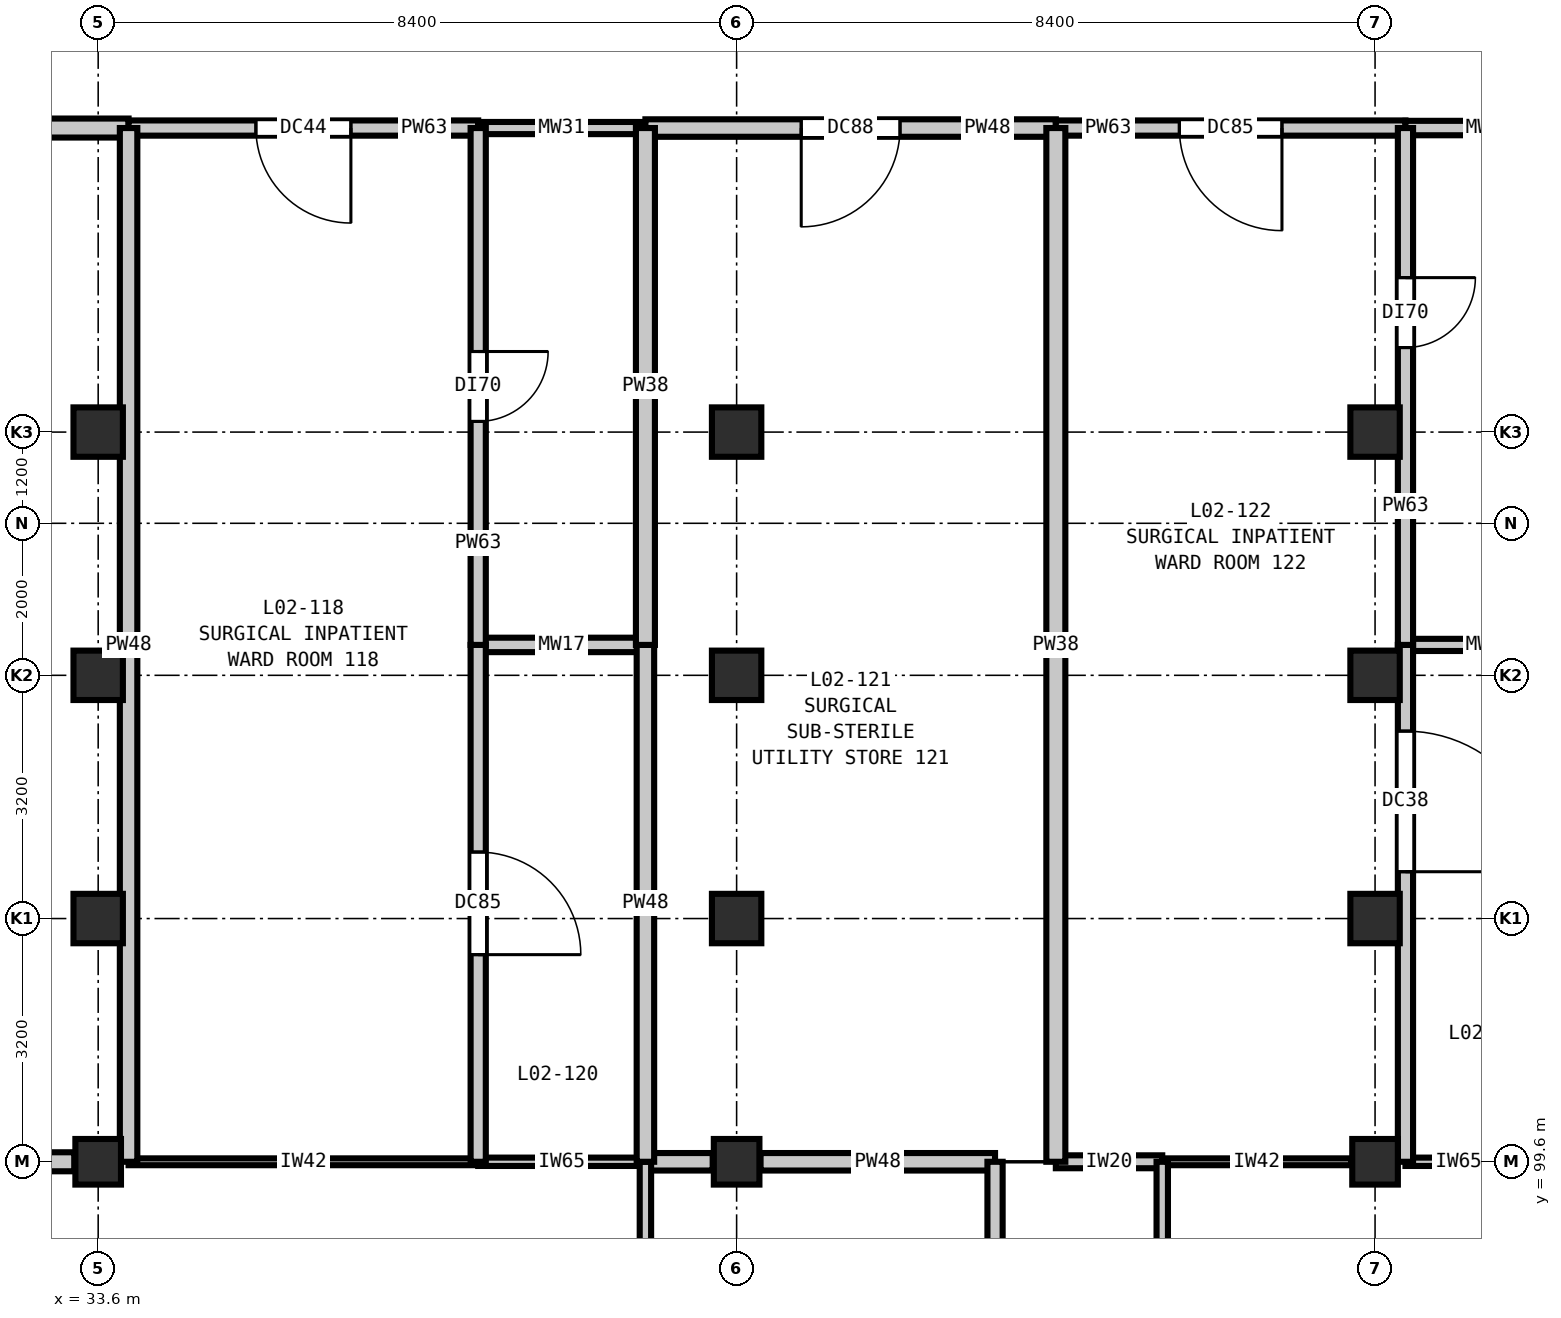
"""IFC4 building model, lengths in metres.
Left out: names, types, materials, properties, quantities, classifications, styles, units other than length and angle.
Written with IfcOpenShell. Run it as: python <this file> out.ifc"""

import sys

from ifc_helpers import new_model, si_unit, direction, frame, frame_2d, origin, origin_2d, place, context, subcontext, project, spatial, rectangle, extrude, element, fill, save


model = new_model("IFC4")
c1 = context("Model", 3, precision=1e-05, world=origin(), true_north=direction((0.0, 1.0)))
c2 = subcontext(c1, "Body", "Model", "MODEL_VIEW")
j1 = project(units=[si_unit("LENGTHUNIT", "METRE"), si_unit("PLANEANGLEUNIT", "RADIAN")], contexts=[c1])
p1 = place(None, origin())
s1 = spatial("IfcSite", under=j1, at=p1, CompositionType="ELEMENT")
p2 = place(p1, origin())
s2 = spatial("IfcBuilding", under=s1, at=p2, CompositionType="ELEMENT")
p3 = place(p2, frame((0.0, 0.0, 10.8)))
s3 = spatial("IfcBuildingStorey", under=s2, at=p3, CompositionType="ELEMENT", Elevation=10.8)
p4 = place(p3, frame((33.6, 99.6, 0.0), z_axis=(0.0, 0.0, 1.0), x_axis=(1.0, 0.0, 0.0)))
e1 = element("IfcColumn", 1, at=p4, inside=s3, PredefinedType="COLUMN", context=c2, shape_type="SweptSolid", body=[
    extrude(rectangle(XDim=0.6, YDim=0.6, at=origin_2d()), origin(), (0.0, 0.0, 1.0), 5.4),
])
for number, where, z_axis, x_axis in (
    (2, (33.6, 102.8, 0.0), (0.0, 0.0, 1.0), (1.0, 0.0, 0.0)),
    (3, (33.6, 106.0, 0.0), (0.0, 0.0, 1.0), (1.0, 0.0, 0.0)),
    (4, (33.6, 109.2, 0.0), (0.0, 0.0, 1.0), (1.0, 0.0, 0.0)),
):
    element("IfcColumn", number, at=place(p3, frame(where, z_axis=z_axis, x_axis=x_axis)), inside=s3, PredefinedType="COLUMN", context=c2, shape_type="SweptSolid", body=[
        extrude(rectangle(XDim=0.65, YDim=0.65, at=origin_2d()), origin(), (0.0, 0.0, 1.0), 5.4),
    ])
p5 = place(p3, frame((42.0, 99.6, 0.0), z_axis=(0.0, 0.0, 1.0), x_axis=(1.0, 0.0, 0.0)))
e5 = element("IfcColumn", 5, at=p5, inside=s3, PredefinedType="COLUMN", context=c2, shape_type="SweptSolid", body=[
    extrude(rectangle(XDim=0.6, YDim=0.6, at=origin_2d()), origin(), (0.0, 0.0, 1.0), 5.4),
])
for number, where, z_axis, x_axis in (
    (6, (42.0, 102.8, 0.0), (0.0, 0.0, 1.0), (1.0, 0.0, 0.0)),
    (7, (42.0, 106.0, 0.0), (0.0, 0.0, 1.0), (1.0, 0.0, 0.0)),
    (8, (42.0, 109.2, 0.0), (0.0, 0.0, 1.0), (1.0, 0.0, 0.0)),
):
    element("IfcColumn", number, at=place(p3, frame(where, z_axis=z_axis, x_axis=x_axis)), inside=s3, PredefinedType="COLUMN", context=c2, shape_type="SweptSolid", body=[
        extrude(rectangle(XDim=0.65, YDim=0.65, at=origin_2d()), origin(), (0.0, 0.0, 1.0), 5.4),
    ])
p6 = place(p3, frame((50.4, 99.6, 0.0), z_axis=(0.0, 0.0, 1.0), x_axis=(1.0, 0.0, 0.0)))
e9 = element("IfcColumn", 9, at=p6, inside=s3, PredefinedType="COLUMN", context=c2, shape_type="SweptSolid", body=[
    extrude(rectangle(XDim=0.6, YDim=0.6, at=origin_2d()), origin(), (0.0, 0.0, 1.0), 5.4),
])
for number, where, z_axis, x_axis in (
    (10, (50.4, 102.8, 0.0), (0.0, 0.0, 1.0), (1.0, 0.0, 0.0)),
    (11, (50.4, 106.0, 0.0), (0.0, 0.0, 1.0), (1.0, 0.0, 0.0)),
    (12, (50.4, 109.2, 0.0), (0.0, 0.0, 1.0), (1.0, 0.0, 0.0)),
):
    element("IfcColumn", number, at=place(p3, frame(where, z_axis=z_axis, x_axis=x_axis)), inside=s3, PredefinedType="COLUMN", context=c2, shape_type="SweptSolid", body=[
        extrude(rectangle(XDim=0.65, YDim=0.65, at=origin_2d()), origin(), (0.0, 0.0, 1.0), 5.4),
    ])
p7 = place(p3, frame((29.6, 99.6, 0.0), z_axis=(0.0, 0.0, 1.0), x_axis=(1.0, 0.0, 0.0)))
e13 = element("IfcWall", 13, at=p7, inside=s3, PredefinedType="PARTITIONING", context=c2, shape_type="SweptSolid", body=[
    extrude(rectangle(XDim=3.685, YDim=0.25, at=frame_2d((1.842, 0.0))), origin(), (0.0, 0.0, 1.0), 4.735),
])
p8 = place(p3, frame((34.0, 99.6, 0.0), z_axis=(0.0, 0.0, 1.0), x_axis=(1.0, 0.0, 0.0)))
e14 = element("IfcWall", 14, at=p8, inside=s3, PredefinedType="PARTITIONING", context=c2, shape_type="SweptSolid", body=[
    extrude(rectangle(XDim=4.6, YDim=0.09, at=frame_2d((2.3, 0.0))), origin(), (0.0, 0.0, 1.0), 4.735),
])
p9 = place(p3, frame((38.6, 99.6, 0.0), z_axis=(0.0, 0.0, 1.0), x_axis=(1.0, 0.0, 0.0)))
e15 = element("IfcWall", 15, at=p9, inside=s3, PredefinedType="PARTITIONING", context=c2, shape_type="SweptSolid", body=[
    extrude(rectangle(XDim=2.2, YDim=0.11, at=frame_2d((1.1, 0.0))), origin(), (0.0, 0.0, 1.0), 4.735),
])
p10 = place(p3, frame((42.315, 99.6, 0.0), z_axis=(0.0, 0.0, 1.0), x_axis=(1.0, 0.0, 0.0)))
e16 = element("IfcWall", 16, at=p10, inside=s3, PredefinedType="PARTITIONING", context=c2, shape_type="SweptSolid", body=[
    extrude(rectangle(XDim=3.085, YDim=0.23, at=frame_2d((1.542, 0.0))), origin(), (0.0, 0.0, 1.0), 4.735),
])
p11 = place(p3, frame((40.8, 99.6, 0.0), z_axis=(0.0, 0.0, 1.0), x_axis=(1.0, 0.0, 0.0)))
e17 = element("IfcWall", 17, at=p11, inside=s3, PredefinedType="PARTITIONING", context=c2, shape_type="SweptSolid", body=[
    extrude(rectangle(XDim=0.885, YDim=0.23, at=frame_2d((0.442, 0.0))), origin(), (0.0, 0.0, 1.0), 4.735),
])
p12 = place(p3, frame((46.2, 99.6, 0.0), z_axis=(0.0, 0.0, 1.0), x_axis=(1.0, 0.0, 0.0)))
e18 = element("IfcWall", 18, at=p12, inside=s3, PredefinedType="PARTITIONING", context=c2, shape_type="SweptSolid", body=[
    extrude(rectangle(XDim=1.4, YDim=0.17, at=frame_2d((0.7, 0.0))), origin(), (0.0, 0.0, 1.0), 4.735),
])
p13 = place(p3, frame((47.6, 99.6, 0.0), z_axis=(0.0, 0.0, 1.0), x_axis=(1.0, 0.0, 0.0)))
e19 = element("IfcWall", 19, at=p13, inside=s3, PredefinedType="PARTITIONING", context=c2, shape_type="SweptSolid", body=[
    extrude(rectangle(XDim=2.485, YDim=0.09, at=frame_2d((1.242, 0.0))), origin(), (0.0, 0.0, 1.0), 4.735),
])
p14 = place(p3, frame((50.8, 99.6, 0.0), z_axis=(0.0, 0.0, 1.0), x_axis=(1.0, 0.0, 0.0)))
e20 = element("IfcWall", 20, at=p14, inside=s3, PredefinedType="PARTITIONING", context=c2, shape_type="SweptSolid", body=[
    extrude(rectangle(XDim=1.4, YDim=0.11, at=frame_2d((0.7, 0.0))), origin(), (0.0, 0.0, 1.0), 4.735),
])
p15 = place(p3, frame((38.6, 106.4, 0.0), z_axis=(0.0, 0.0, 1.0), x_axis=(1.0, 0.0, 0.0)))
e21 = element("IfcWall", 21, at=p15, inside=s3, PredefinedType="PLUMBINGWALL", context=c2, shape_type="SweptSolid", body=[
    extrude(rectangle(XDim=2.2, YDim=0.19, at=frame_2d((1.1, 0.0))), origin(), (0.0, 0.0, 1.0), 5.07),
])
p16 = place(p3, frame((50.8, 106.4, 0.0), z_axis=(0.0, 0.0, 1.0), x_axis=(1.0, 0.0, 0.0)))
e22 = element("IfcWall", 22, at=p16, inside=s3, PredefinedType="PLUMBINGWALL", context=c2, shape_type="SweptSolid", body=[
    extrude(rectangle(XDim=2.2, YDim=0.16, at=frame_2d((1.1, 0.0))), origin(), (0.0, 0.0, 1.0), 5.07),
])
p17 = place(p3, frame((28.6, 113.2, 0.0), z_axis=(0.0, 0.0, 1.0), x_axis=(1.0, 0.0, 0.0)))
e23 = element("IfcWall", 23, at=p17, inside=s3, PredefinedType="PARTITIONING", context=c2, shape_type="SweptSolid", body=[
    extrude(rectangle(XDim=5.4, YDim=0.25, at=frame_2d((2.7, 0.0))), origin(), (0.0, 0.0, 1.0), 5.07),
])
p18 = place(p17, frame((1.775, 0.0, 0.0)))
e24 = element("IfcOpeningElement", 24, at=p18, cuts=e23, PredefinedType="OPENING", context=c2, shape_type="SweptSolid", body=[
    extrude(rectangle(XDim=1.85, YDim=2.3, at=frame_2d((0.925, 1.15))), frame((0.0, 0.135, 0.0), z_axis=(0.0, -1.0, 0.0), x_axis=(1.0, 0.0, 0.0)), (0.0, 0.0, 1.0), 0.27),
])
p19 = place(p3, frame((34.0, 113.2, 0.0), z_axis=(0.0, 0.0, 1.0), x_axis=(1.0, 0.0, 0.0)))
e25 = element("IfcWall", 25, at=p19, inside=s3, PredefinedType="PARTITIONING", context=c2, shape_type="SweptSolid", body=[
    extrude(rectangle(XDim=4.6, YDim=0.2, at=frame_2d((2.3, 0.0))), origin(), (0.0, 0.0, 1.0), 5.07),
])
p20 = place(p19, frame((1.675, 0.0, 0.0)))
e26 = element("IfcOpeningElement", 26, at=p20, cuts=e25, PredefinedType="OPENING", context=c2, shape_type="SweptSolid", body=[
    extrude(rectangle(XDim=1.25, YDim=2.15, at=frame_2d((0.625, 1.075))), frame((0.0, 0.11, 0.0), z_axis=(0.0, -1.0, 0.0), x_axis=(1.0, 0.0, 0.0)), (0.0, 0.0, 1.0), 0.22),
])
p21 = place(p3, frame((38.6, 113.2, 0.0), z_axis=(0.0, 0.0, 1.0), x_axis=(1.0, 0.0, 0.0)))
e27 = element("IfcWall", 27, at=p21, inside=s3, PredefinedType="PLUMBINGWALL", context=c2, shape_type="SweptSolid", body=[
    extrude(rectangle(XDim=2.2, YDim=0.16, at=frame_2d((1.1, 0.0))), origin(), (0.0, 0.0, 1.0), 5.07),
])
p22 = place(p3, frame((40.8, 113.2, 0.0), z_axis=(0.0, 0.0, 1.0), x_axis=(1.0, 0.0, 0.0)))
e28 = element("IfcWall", 28, at=p22, inside=s3, PredefinedType="PARTITIONING", context=c2, shape_type="SweptSolid", body=[
    extrude(rectangle(XDim=5.4, YDim=0.23, at=frame_2d((2.7, 0.0))), origin(), (0.0, 0.0, 1.0), 5.07),
])
p23 = place(p22, frame((2.05, 0.0, 0.0)))
e29 = element("IfcOpeningElement", 29, at=p23, cuts=e28, PredefinedType="OPENING", context=c2, shape_type="SweptSolid", body=[
    extrude(rectangle(XDim=1.3, YDim=2.2, at=frame_2d((0.65, 1.1))), frame((0.0, 0.125, 0.0), z_axis=(0.0, -1.0, 0.0), x_axis=(1.0, 0.0, 0.0)), (0.0, 0.0, 1.0), 0.25),
])
p24 = place(p3, frame((46.2, 113.2, 0.0), z_axis=(0.0, 0.0, 1.0), x_axis=(1.0, 0.0, 0.0)))
e30 = element("IfcWall", 30, at=p24, inside=s3, PredefinedType="PARTITIONING", context=c2, shape_type="SweptSolid", body=[
    extrude(rectangle(XDim=4.6, YDim=0.2, at=frame_2d((2.3, 0.0))), origin(), (0.0, 0.0, 1.0), 5.07),
])
p25 = place(p24, frame((1.625, 0.0, 0.0)))
e31 = element("IfcOpeningElement", 31, at=p25, cuts=e30, PredefinedType="OPENING", context=c2, shape_type="SweptSolid", body=[
    extrude(rectangle(XDim=1.35, YDim=2.2, at=frame_2d((0.675, 1.1))), frame((0.0, 0.11, 0.0), z_axis=(0.0, -1.0, 0.0), x_axis=(1.0, 0.0, 0.0)), (0.0, 0.0, 1.0), 0.22),
])
p26 = place(p3, frame((50.8, 113.2, 0.0), z_axis=(0.0, 0.0, 1.0), x_axis=(1.0, 0.0, 0.0)))
e32 = element("IfcWall", 32, at=p26, inside=s3, PredefinedType="PLUMBINGWALL", context=c2, shape_type="SweptSolid", body=[
    extrude(rectangle(XDim=2.2, YDim=0.19, at=frame_2d((1.1, 0.0))), origin(), (0.0, 0.0, 1.0), 5.07),
])
p27 = place(p3, frame((34.0, 99.6, 0.0), z_axis=(0.0, 0.0, 1.0), x_axis=(0.0, 1.0, 0.0)))
e33 = element("IfcWall", 33, at=p27, inside=s3, PredefinedType="PARTITIONING", context=c2, shape_type="SweptSolid", body=[
    extrude(rectangle(XDim=13.6, YDim=0.23, at=frame_2d((6.8, 0.0))), origin(), (0.0, 0.0, 1.0), 5.07),
])
p28 = place(p3, frame((38.6, 99.6, 0.0), z_axis=(0.0, 0.0, 1.0), x_axis=(0.0, 1.0, 0.0)))
e34 = element("IfcWall", 34, at=p28, inside=s3, PredefinedType="PARTITIONING", context=c2, shape_type="SweptSolid", body=[
    extrude(rectangle(XDim=6.8, YDim=0.2, at=frame_2d((3.4, 0.0))), origin(), (0.0, 0.0, 1.0), 5.07),
])
p29 = place(p28, frame((2.725, 0.0, 0.0)))
e35 = element("IfcOpeningElement", 35, at=p29, cuts=e34, PredefinedType="OPENING", context=c2, shape_type="SweptSolid", body=[
    extrude(rectangle(XDim=1.35, YDim=2.2, at=frame_2d((0.675, 1.1))), frame((0.0, 0.11, 0.0), z_axis=(0.0, -1.0, 0.0), x_axis=(1.0, 0.0, 0.0)), (0.0, 0.0, 1.0), 0.22),
])
p30 = place(p3, frame((38.6, 106.4, 0.0), z_axis=(0.0, 0.0, 1.0), x_axis=(0.0, 1.0, 0.0)))
e36 = element("IfcWall", 36, at=p30, inside=s3, PredefinedType="PARTITIONING", context=c2, shape_type="SweptSolid", body=[
    extrude(rectangle(XDim=6.8, YDim=0.2, at=frame_2d((3.4, 0.0))), origin(), (0.0, 0.0, 1.0), 5.07),
])
p31 = place(p30, frame((2.94, 0.0, 0.0)))
e37 = element("IfcOpeningElement", 37, at=p31, cuts=e36, PredefinedType="OPENING", context=c2, shape_type="SweptSolid", body=[
    extrude(rectangle(XDim=0.92, YDim=2.1, at=frame_2d((0.46, 1.05))), frame((0.0, 0.11, 0.0), z_axis=(0.0, -1.0, 0.0), x_axis=(1.0, 0.0, 0.0)), (0.0, 0.0, 1.0), 0.22),
])
p32 = place(p3, frame((40.8, 88.6, 0.0), z_axis=(0.0, 0.0, 1.0), x_axis=(0.0, 1.0, 0.0)))
e38 = element("IfcWall", 38, at=p32, inside=s3, PredefinedType="PARTITIONING", context=c2, shape_type="SweptSolid", body=[
    extrude(rectangle(XDim=11.0, YDim=0.15, at=frame_2d((5.5, 0.0))), origin(), (0.0, 0.0, 1.0), 5.07),
])
p33 = place(p3, frame((40.8, 99.6, 0.0), z_axis=(0.0, 0.0, 1.0), x_axis=(0.0, 1.0, 0.0)))
e39 = element("IfcWall", 39, at=p33, inside=s3, PredefinedType="PARTITIONING", context=c2, shape_type="SweptSolid", body=[
    extrude(rectangle(XDim=6.8, YDim=0.23, at=frame_2d((3.4, 0.0))), origin(), (0.0, 0.0, 1.0), 5.07),
])
p34 = place(p3, frame((40.8, 106.4, 0.0), z_axis=(0.0, 0.0, 1.0), x_axis=(0.0, 1.0, 0.0)))
e40 = element("IfcWall", 40, at=p34, inside=s3, PredefinedType="PARTITIONING", context=c2, shape_type="SweptSolid", body=[
    extrude(rectangle(XDim=6.8, YDim=0.25, at=frame_2d((3.4, 0.0))), origin(), (0.0, 0.0, 1.0), 5.07),
])
p35 = place(p3, frame((45.4, 94.1, 0.0), z_axis=(0.0, 0.0, 1.0), x_axis=(0.0, 1.0, 0.0)))
e41 = element("IfcWall", 41, at=p35, inside=s3, PredefinedType="PARTITIONING", context=c2, shape_type="SweptSolid", body=[
    extrude(rectangle(XDim=5.5, YDim=0.2, at=frame_2d((2.75, 0.0))), origin(), (0.0, 0.0, 1.0), 5.07),
])
p36 = place(p35, frame((1.9, 0.0, 0.0)))
e42 = element("IfcOpeningElement", 42, at=p36, cuts=e41, PredefinedType="OPENING", context=c2, shape_type="SweptSolid", body=[
    extrude(rectangle(XDim=1.7, YDim=2.3, at=frame_2d((0.85, 1.15))), frame((0.0, 0.11, 0.0), z_axis=(0.0, -1.0, 0.0), x_axis=(1.0, 0.0, 0.0)), (0.0, 0.0, 1.0), 0.22),
])
p37 = place(p3, frame((46.2, 99.6, 0.0), z_axis=(0.0, 0.0, 1.0), x_axis=(0.0, 1.0, 0.0)))
e43 = element("IfcWall", 43, at=p37, inside=s3, PredefinedType="PARTITIONING", context=c2, shape_type="SweptSolid", body=[
    extrude(rectangle(XDim=13.6, YDim=0.25, at=frame_2d((6.8, 0.0))), origin(), (0.0, 0.0, 1.0), 5.07),
])
p38 = place(p3, frame((47.6, 94.1, 0.0), z_axis=(0.0, 0.0, 1.0), x_axis=(0.0, 1.0, 0.0)))
e44 = element("IfcWall", 44, at=p38, inside=s3, PredefinedType="PARTITIONING", context=c2, shape_type="SweptSolid", body=[
    extrude(rectangle(XDim=5.5, YDim=0.15, at=frame_2d((2.75, 0.0))), origin(), (0.0, 0.0, 1.0), 5.07),
])
p39 = place(p3, frame((50.8, 99.6, 0.0), z_axis=(0.0, 0.0, 1.0), x_axis=(0.0, 1.0, 0.0)))
e45 = element("IfcWall", 45, at=p39, inside=s3, PredefinedType="PARTITIONING", context=c2, shape_type="SweptSolid", body=[
    extrude(rectangle(XDim=6.8, YDim=0.2, at=frame_2d((3.4, 0.0))), origin(), (0.0, 0.0, 1.0), 5.07),
])
p40 = place(p39, frame((3.816, 0.0, 0.0)))
e46 = element("IfcOpeningElement", 46, at=p40, cuts=e45, PredefinedType="OPENING", context=c2, shape_type="SweptSolid", body=[
    extrude(rectangle(XDim=1.85, YDim=2.3, at=frame_2d((0.925, 1.15))), frame((0.0, 0.11, 0.0), z_axis=(0.0, -1.0, 0.0), x_axis=(1.0, 0.0, 0.0)), (0.0, 0.0, 1.0), 0.22),
])
p41 = place(p3, frame((50.8, 106.4, 0.0), z_axis=(0.0, 0.0, 1.0), x_axis=(0.0, 1.0, 0.0)))
e47 = element("IfcWall", 47, at=p41, inside=s3, PredefinedType="PARTITIONING", context=c2, shape_type="SweptSolid", body=[
    extrude(rectangle(XDim=6.8, YDim=0.2, at=frame_2d((3.4, 0.0))), origin(), (0.0, 0.0, 1.0), 5.07),
])
p42 = place(p41, frame((3.912, 0.0, 0.0)))
e48 = element("IfcOpeningElement", 48, at=p42, cuts=e47, PredefinedType="OPENING", context=c2, shape_type="SweptSolid", body=[
    extrude(rectangle(XDim=0.92, YDim=2.1, at=frame_2d((0.46, 1.05))), frame((0.0, 0.11, 0.0), z_axis=(0.0, -1.0, 0.0), x_axis=(1.0, 0.0, 0.0)), (0.0, 0.0, 1.0), 0.22),
])
p43 = place(p20, frame((1.25, 0.0, 0.0), z_axis=(0.0, 0.0, 1.0), x_axis=(-1.0, 0.0, 0.0)))
e49 = element("IfcDoor", 49, at=p43, inside=s3, OperationType="SINGLE_SWING_LEFT", PredefinedType="DOOR", context=c2, shape_type="SweptSolid", body=[
    extrude(rectangle(XDim=1.25, YDim=2.15, at=frame_2d((0.625, 1.075))), frame((0.0, 0.025, 0.0), z_axis=(0.0, -1.0, 0.0), x_axis=(1.0, 0.0, 0.0)), (0.0, 0.0, 1.0), 0.05),
])
fill(e26, e49)
p44 = place(p23, frame((1.3, 0.0, 0.0), z_axis=(0.0, 0.0, 1.0), x_axis=(-1.0, 0.0, 0.0)))
e50 = element("IfcDoor", 50, at=p44, inside=s3, OperationType="SINGLE_SWING_RIGHT", PredefinedType="DOOR", context=c2, shape_type="SweptSolid", body=[
    extrude(rectangle(XDim=1.3, YDim=2.2, at=frame_2d((0.65, 1.1))), frame((0.0, 0.025, 0.0), z_axis=(0.0, -1.0, 0.0), x_axis=(1.0, 0.0, 0.0)), (0.0, 0.0, 1.0), 0.05),
])
fill(e29, e50)
p45 = place(p25, frame((1.35, 0.0, 0.0), z_axis=(0.0, 0.0, 1.0), x_axis=(-1.0, 0.0, 0.0)))
e51 = element("IfcDoor", 51, at=p45, inside=s3, OperationType="SINGLE_SWING_LEFT", PredefinedType="DOOR", context=c2, shape_type="SweptSolid", body=[
    extrude(rectangle(XDim=1.35, YDim=2.2, at=frame_2d((0.675, 1.1))), frame((0.0, 0.025, 0.0), z_axis=(0.0, -1.0, 0.0), x_axis=(1.0, 0.0, 0.0)), (0.0, 0.0, 1.0), 0.05),
])
fill(e31, e51)
p46 = place(p29, frame((1.35, 0.0, 0.0), z_axis=(0.0, 0.0, 1.0), x_axis=(-1.0, 0.0, 0.0)))
e52 = element("IfcDoor", 52, at=p46, inside=s3, OperationType="SINGLE_SWING_RIGHT", PredefinedType="DOOR", context=c2, shape_type="SweptSolid", body=[
    extrude(rectangle(XDim=1.35, YDim=2.2, at=frame_2d((0.675, 1.1))), frame((0.0, 0.025, 0.0), z_axis=(0.0, -1.0, 0.0), x_axis=(1.0, 0.0, 0.0)), (0.0, 0.0, 1.0), 0.05),
])
fill(e35, e52)
p47 = place(p31, frame((0.92, 0.0, 0.0), z_axis=(0.0, 0.0, 1.0), x_axis=(-1.0, 0.0, 0.0)))
e53 = element("IfcDoor", 53, at=p47, inside=s3, OperationType="SINGLE_SWING_LEFT", PredefinedType="DOOR", context=c2, shape_type="SweptSolid", body=[
    extrude(rectangle(XDim=0.92, YDim=2.1, at=frame_2d((0.46, 1.05))), frame((0.0, 0.025, 0.0), z_axis=(0.0, -1.0, 0.0), x_axis=(1.0, 0.0, 0.0)), (0.0, 0.0, 1.0), 0.05),
])
fill(e37, e53)
p48 = place(p40, frame((1.85, 0.0, 0.0), z_axis=(0.0, 0.0, 1.0), x_axis=(-1.0, 0.0, 0.0)))
e54 = element("IfcDoor", 54, at=p48, inside=s3, OperationType="SINGLE_SWING_RIGHT", PredefinedType="DOOR", context=c2, shape_type="SweptSolid", body=[
    extrude(rectangle(XDim=1.85, YDim=2.3, at=frame_2d((0.925, 1.15))), frame((0.0, 0.025, 0.0), z_axis=(0.0, -1.0, 0.0), x_axis=(1.0, 0.0, 0.0)), (0.0, 0.0, 1.0), 0.05),
])
fill(e46, e54)
p49 = place(p42, frame((0.92, 0.0, 0.0), z_axis=(0.0, 0.0, 1.0), x_axis=(-1.0, 0.0, 0.0)))
e55 = element("IfcDoor", 55, at=p49, inside=s3, OperationType="SINGLE_SWING_LEFT", PredefinedType="DOOR", context=c2, shape_type="SweptSolid", body=[
    extrude(rectangle(XDim=0.92, YDim=2.1, at=frame_2d((0.46, 1.05))), frame((0.0, 0.025, 0.0), z_axis=(0.0, -1.0, 0.0), x_axis=(1.0, 0.0, 0.0)), (0.0, 0.0, 1.0), 0.05),
])
fill(e48, e55)
save(model, sys.argv[1])
